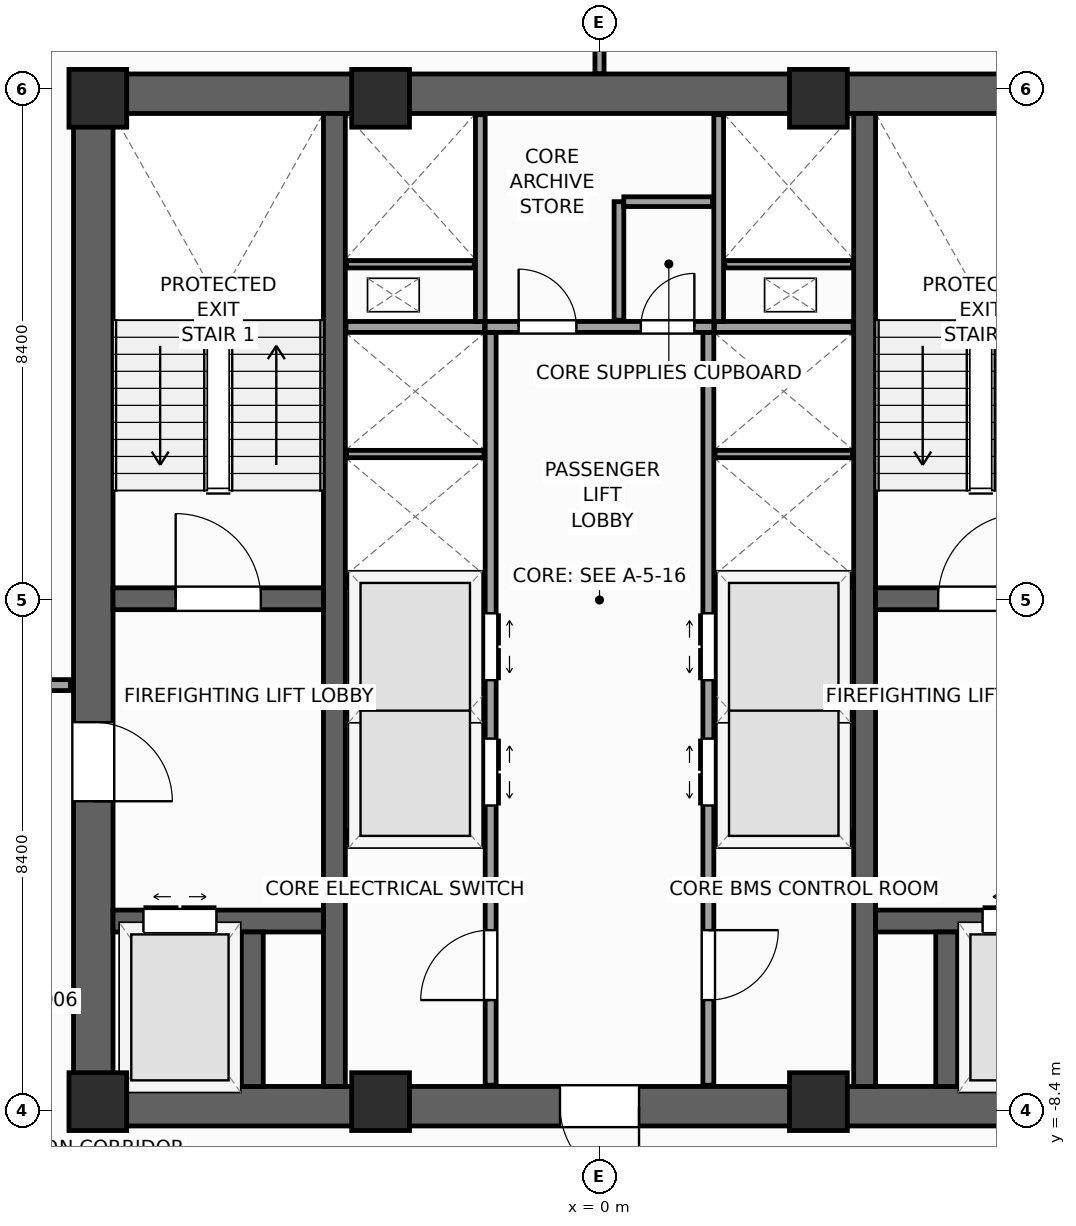
"""IFC4 building model, lengths in metres.
Left out: names, types, materials, properties, quantities, classifications, styles, units other than length and angle.
Written with IfcOpenShell. Run it as: python <this file> out.ifc"""

import sys

from ifc_helpers import new_model, si_unit, direction, frame, frame_2d, origin, origin_2d, place, context, subcontext, project, spatial, rectangle, extrude, source, transform, mapped, element, fill, save


model = new_model("IFC4")
c1 = context("Model", 3, precision=1e-05, world=origin(), true_north=direction((0.0, 1.0)))
c2 = subcontext(c1, "Body", "Model", "MODEL_VIEW")
j1 = project(units=[si_unit("LENGTHUNIT", "METRE"), si_unit("PLANEANGLEUNIT", "RADIAN")], contexts=[c1])
p1 = place(None, origin())
s1 = spatial("IfcSite", under=j1, at=p1, CompositionType="ELEMENT")
p2 = place(p1, origin())
s2 = spatial("IfcBuilding", under=s1, at=p2, CompositionType="ELEMENT")
p3 = place(p2, frame((0.0, 0.0, 148.4)))
s3 = spatial("IfcBuildingStorey", under=s2, at=p3, CompositionType="ELEMENT", Elevation=148.4)
p4 = place(p3, frame((-8.65, -8.325, 0.0), z_axis=(0.0, 0.0, 1.0), x_axis=(1.0, 0.0, 0.0)))
e1 = element("IfcWall", 1, at=p4, inside=s3, PredefinedType="SHEAR", context=c2, shape_type="SweptSolid", body=[
    extrude(rectangle(XDim=17.3, YDim=0.65, at=frame_2d((8.65, 0.0))), origin(), (0.0, 0.0, 1.0), 4.0),
])
p5 = place(p4, frame((8.0, 0.0, 0.0)))
e2 = element("IfcOpeningElement", 2, at=p5, cuts=e1, PredefinedType="OPENING", context=c2, shape_type="SweptSolid", body=[
    extrude(rectangle(XDim=1.3, YDim=2.2, at=frame_2d((0.65, 1.1))), frame((0.0, 0.335, 0.0), z_axis=(0.0, -1.0, 0.0), x_axis=(1.0, 0.0, 0.0)), (0.0, 0.0, 1.0), 0.67),
])
p6 = place(p3, frame((-8.65, 8.325, 0.0), z_axis=(0.0, 0.0, 1.0), x_axis=(1.0, 0.0, 0.0)))
e3 = element("IfcWall", 3, at=p6, inside=s3, PredefinedType="SHEAR", context=c2, shape_type="SweptSolid", body=[
    extrude(rectangle(XDim=17.3, YDim=0.65, at=frame_2d((8.65, 0.0))), origin(), (0.0, 0.0, 1.0), 4.0),
])
p7 = place(p3, frame((-8.325, -8.0, 0.0), z_axis=(0.0, 0.0, 1.0), x_axis=(0.0, 1.0, 0.0)))
e4 = element("IfcWall", 4, at=p7, inside=s3, PredefinedType="SHEAR", context=c2, shape_type="SweptSolid", body=[
    extrude(rectangle(XDim=16.0, YDim=0.65, at=frame_2d((8.0, 0.0))), origin(), (0.0, 0.0, 1.0), 4.0),
])
p8 = place(p7, frame((4.69, 0.0, 0.0)))
e5 = element("IfcOpeningElement", 5, at=p8, cuts=e4, PredefinedType="OPENING", context=c2, shape_type="SweptSolid", body=[
    extrude(rectangle(XDim=1.3, YDim=2.2, at=frame_2d((0.65, 1.1))), frame((0.0, 0.335, 0.0), z_axis=(0.0, -1.0, 0.0), x_axis=(1.0, 0.0, 0.0)), (0.0, 0.0, 1.0), 0.67),
])
for number, where, z_axis, x_axis in (
    (6, (-4.36, -8.0, 0.0), (0.0, 0.0, 1.0), (0.0, 1.0, 0.0)),
    (7, (4.36, -8.0, 0.0), (0.0, 0.0, 1.0), (0.0, 1.0, 0.0)),
):
    element("IfcWall", number, at=place(p3, frame(where, z_axis=z_axis, x_axis=x_axis)), inside=s3, PredefinedType="SHEAR", context=c2, shape_type="SweptSolid", body=[
        extrude(rectangle(XDim=16.0, YDim=0.36, at=frame_2d((8.0, 0.0))), origin(), (0.0, 0.0, 1.0), 4.0),
    ])
p9 = place(p3, frame((-8.0, 0.02, 0.0), z_axis=(0.0, 0.0, 1.0), x_axis=(1.0, 0.0, 0.0)))
e8 = element("IfcWall", 8, at=p9, inside=s3, PredefinedType="SHEAR", context=c2, shape_type="SweptSolid", body=[
    extrude(rectangle(XDim=3.46, YDim=0.36, at=frame_2d((1.73, 0.0))), origin(), (0.0, 0.0, 1.0), 4.0),
])
p10 = place(p9, frame((1.03, 0.0, 0.0)))
e9 = element("IfcOpeningElement", 9, at=p10, cuts=e8, PredefinedType="OPENING", context=c2, shape_type="SweptSolid", body=[
    extrude(rectangle(XDim=1.4, YDim=2.2, at=frame_2d((0.7, 1.1))), frame((0.0, 0.19, 0.0), z_axis=(0.0, -1.0, 0.0), x_axis=(1.0, 0.0, 0.0)), (0.0, 0.0, 1.0), 0.38),
])
p11 = place(p3, frame((4.54, 0.02, 0.0), z_axis=(0.0, 0.0, 1.0), x_axis=(1.0, 0.0, 0.0)))
e10 = element("IfcWall", 10, at=p11, inside=s3, PredefinedType="SHEAR", context=c2, shape_type="SweptSolid", body=[
    extrude(rectangle(XDim=3.46, YDim=0.36, at=frame_2d((1.73, 0.0))), origin(), (0.0, 0.0, 1.0), 4.0),
])
p12 = place(p11, frame((1.03, 0.0, 0.0)))
e11 = element("IfcOpeningElement", 11, at=p12, cuts=e10, PredefinedType="OPENING", context=c2, shape_type="SweptSolid", body=[
    extrude(rectangle(XDim=1.4, YDim=2.2, at=frame_2d((0.7, 1.1))), frame((0.0, 0.19, 0.0), z_axis=(0.0, -1.0, 0.0), x_axis=(1.0, 0.0, 0.0)), (0.0, 0.0, 1.0), 0.38),
])
p13 = place(p3, frame((-8.0, -5.28, 0.0), z_axis=(0.0, 0.0, 1.0), x_axis=(1.0, 0.0, 0.0)))
e12 = element("IfcWall", 12, at=p13, inside=s3, PredefinedType="SHEAR", context=c2, shape_type="SweptSolid", body=[
    extrude(rectangle(XDim=3.46, YDim=0.36, at=frame_2d((1.73, 0.0))), origin(), (0.0, 0.0, 1.0), 4.0),
])
p14 = place(p13, frame((0.5, 0.0, 0.0)))
e13 = element("IfcOpeningElement", 13, at=p14, cuts=e12, PredefinedType="OPENING", context=c2, shape_type="SweptSolid", body=[
    extrude(rectangle(XDim=1.2, YDim=2.25, at=frame_2d((0.6, 1.125))), frame((0.0, 0.19, 0.0), z_axis=(0.0, -1.0, 0.0), x_axis=(1.0, 0.0, 0.0)), (0.0, 0.0, 1.0), 0.38),
])
p15 = place(p3, frame((4.54, -5.28, 0.0), z_axis=(0.0, 0.0, 1.0), x_axis=(1.0, 0.0, 0.0)))
e14 = element("IfcWall", 14, at=p15, inside=s3, PredefinedType="SHEAR", context=c2, shape_type="SweptSolid", body=[
    extrude(rectangle(XDim=3.46, YDim=0.36, at=frame_2d((1.73, 0.0))), origin(), (0.0, 0.0, 1.0), 4.0),
])
p16 = place(p15, frame((1.76, 0.0, 0.0)))
e15 = element("IfcOpeningElement", 15, at=p16, cuts=e14, PredefinedType="OPENING", context=c2, shape_type="SweptSolid", body=[
    extrude(rectangle(XDim=1.2, YDim=2.25, at=frame_2d((0.6, 1.125))), frame((0.0, 0.19, 0.0), z_axis=(0.0, -1.0, 0.0), x_axis=(1.0, 0.0, 0.0)), (0.0, 0.0, 1.0), 0.38),
])
for number, where, z_axis, x_axis in (
    (16, (-5.71, -8.0, 0.0), (0.0, 0.0, 1.0), (0.0, 1.0, 0.0)),
    (17, (5.71, -8.0, 0.0), (0.0, 0.0, 1.0), (0.0, 1.0, 0.0)),
):
    element("IfcWall", number, at=place(p3, frame(where, z_axis=z_axis, x_axis=x_axis)), inside=s3, PredefinedType="SHEAR", context=c2, shape_type="SweptSolid", body=[
        extrude(rectangle(XDim=2.54, YDim=0.36, at=frame_2d((1.27, 0.0))), origin(), (0.0, 0.0, 1.0), 4.0),
    ])
m1 = source(origin(), c2, "Body", "SweptSolid", [
    extrude(rectangle(XDim=0.95, YDim=0.95, at=origin_2d()), origin(), (0.0, 0.0, 1.0), 4.0),
])
for number, where, z_axis, x_axis in (
    (18, (-8.25, -8.25, 0.0), (0.0, 0.0, 1.0), (1.0, 0.0, 0.0)),
    (19, (-8.25, 8.25, 0.0), (0.0, 0.0, 1.0), (1.0, 0.0, 0.0)),
    (20, (-3.6, -8.25, 0.0), (0.0, 0.0, 1.0), (1.0, 0.0, 0.0)),
    (21, (3.6, -8.25, 0.0), (0.0, 0.0, 1.0), (1.0, 0.0, 0.0)),
    (22, (-3.6, 8.25, 0.0), (0.0, 0.0, 1.0), (1.0, 0.0, 0.0)),
    (23, (3.6, 8.25, 0.0), (0.0, 0.0, 1.0), (1.0, 0.0, 0.0)),
):
    element("IfcColumn", number, at=place(p3, frame(where, z_axis=z_axis, x_axis=x_axis)), inside=s3, PredefinedType="PILASTER", context=c2, shape_type="MappedRepresentation", body=[
        mapped(m1, transform((0.0, 0.0, 0.0), scale=1.0)),
    ])
p17 = place(p3, frame((-1.79, -7.98, 0.0), z_axis=(0.0, 0.0, 1.0), x_axis=(0.0, 1.0, 0.0)))
e24 = element("IfcWall", 24, at=p17, inside=s3, PredefinedType="PARTITIONING", context=c2, shape_type="SweptSolid", body=[
    extrude(rectangle(XDim=12.38, YDim=0.18, at=frame_2d((6.19, 0.0))), origin(), (0.0, 0.0, 1.0), 3.74),
])
p18 = place(p17, frame((4.6, 0.0, 0.0)))
e25 = element("IfcOpeningElement", 25, at=p18, cuts=e24, PredefinedType="OPENING", context=c2, shape_type="SweptSolid", body=[
    extrude(rectangle(XDim=1.1, YDim=2.2, at=frame_2d((0.55, 1.1))), frame((0.0, 0.1, 0.0), z_axis=(0.0, -1.0, 0.0), x_axis=(1.0, 0.0, 0.0)), (0.0, 0.0, 1.0), 0.2),
])
p19 = place(p17, frame((6.66, 0.0, 0.0)))
e26 = element("IfcOpeningElement", 26, at=p19, cuts=e24, PredefinedType="OPENING", context=c2, shape_type="SweptSolid", body=[
    extrude(rectangle(XDim=1.1, YDim=2.2, at=frame_2d((0.55, 1.1))), frame((0.0, 0.1, 0.0), z_axis=(0.0, -1.0, 0.0), x_axis=(1.0, 0.0, 0.0)), (0.0, 0.0, 1.0), 0.2),
])
p20 = place(p17, frame((1.4, 0.0, 0.0)))
e27 = element("IfcOpeningElement", 27, at=p20, cuts=e24, PredefinedType="OPENING", context=c2, shape_type="SweptSolid", body=[
    extrude(rectangle(XDim=1.15, YDim=2.25, at=frame_2d((0.575, 1.125))), frame((0.0, 0.1, 0.0), z_axis=(0.0, -1.0, 0.0), x_axis=(1.0, 0.0, 0.0)), (0.0, 0.0, 1.0), 0.2),
])
p21 = place(p3, frame((1.79, -7.98, 0.0), z_axis=(0.0, 0.0, 1.0), x_axis=(0.0, 1.0, 0.0)))
e28 = element("IfcWall", 28, at=p21, inside=s3, PredefinedType="PARTITIONING", context=c2, shape_type="SweptSolid", body=[
    extrude(rectangle(XDim=12.38, YDim=0.18, at=frame_2d((6.19, 0.0))), origin(), (0.0, 0.0, 1.0), 3.74),
])
p22 = place(p21, frame((4.6, 0.0, 0.0)))
e29 = element("IfcOpeningElement", 29, at=p22, cuts=e28, PredefinedType="OPENING", context=c2, shape_type="SweptSolid", body=[
    extrude(rectangle(XDim=1.1, YDim=2.2, at=frame_2d((0.55, 1.1))), frame((0.0, 0.1, 0.0), z_axis=(0.0, -1.0, 0.0), x_axis=(1.0, 0.0, 0.0)), (0.0, 0.0, 1.0), 0.2),
])
p23 = place(p21, frame((6.66, 0.0, 0.0)))
e30 = element("IfcOpeningElement", 30, at=p23, cuts=e28, PredefinedType="OPENING", context=c2, shape_type="SweptSolid", body=[
    extrude(rectangle(XDim=1.1, YDim=2.2, at=frame_2d((0.55, 1.1))), frame((0.0, 0.1, 0.0), z_axis=(0.0, -1.0, 0.0), x_axis=(1.0, 0.0, 0.0)), (0.0, 0.0, 1.0), 0.2),
])
p24 = place(p21, frame((1.4, 0.0, 0.0)))
e31 = element("IfcOpeningElement", 31, at=p24, cuts=e28, PredefinedType="OPENING", context=c2, shape_type="SweptSolid", body=[
    extrude(rectangle(XDim=1.15, YDim=2.25, at=frame_2d((0.575, 1.125))), frame((0.0, 0.1, 0.0), z_axis=(0.0, -1.0, 0.0), x_axis=(1.0, 0.0, 0.0)), (0.0, 0.0, 1.0), 0.2),
])
p25 = place(p3, frame((-1.88, 4.49, 0.0), z_axis=(0.0, 0.0, 1.0), x_axis=(1.0, 0.0, 0.0)))
e32 = element("IfcWall", 32, at=p25, inside=s3, PredefinedType="PARTITIONING", context=c2, shape_type="SweptSolid", body=[
    extrude(rectangle(XDim=3.76, YDim=0.18, at=frame_2d((1.88, 0.0))), origin(), (0.0, 0.0, 1.0), 3.74),
])
p26 = place(p25, frame((0.55, 0.0, 0.0)))
e33 = element("IfcOpeningElement", 33, at=p26, cuts=e32, PredefinedType="OPENING", context=c2, shape_type="SweptSolid", body=[
    extrude(rectangle(XDim=0.95, YDim=2.1, at=frame_2d((0.475, 1.05))), frame((0.0, 0.1, 0.0), z_axis=(0.0, -1.0, 0.0), x_axis=(1.0, 0.0, 0.0)), (0.0, 0.0, 1.0), 0.2),
])
p27 = place(p25, frame((2.56, 0.0, 0.0)))
e34 = element("IfcOpeningElement", 34, at=p27, cuts=e32, PredefinedType="OPENING", context=c2, shape_type="SweptSolid", body=[
    extrude(rectangle(XDim=0.88, YDim=2.1, at=frame_2d((0.44, 1.05))), frame((0.0, 0.1, 0.0), z_axis=(0.0, -1.0, 0.0), x_axis=(1.0, 0.0, 0.0)), (0.0, 0.0, 1.0), 0.2),
])
for number, where, z_axis, x_axis in (
    (35, (-4.17, -3.9, 0.0), (0.0, 0.0, 1.0), (1.0, 0.0, 0.0)),
    (36, (1.89, -3.9, 0.0), (0.0, 0.0, 1.0), (1.0, 0.0, 0.0)),
    (37, (-4.17, 0.3, 0.0), (0.0, 0.0, 1.0), (1.0, 0.0, 0.0)),
    (38, (1.89, 0.3, 0.0), (0.0, 0.0, 1.0), (1.0, 0.0, 0.0)),
    (39, (-4.17, 4.49, 0.0), (0.0, 0.0, 1.0), (1.0, 0.0, 0.0)),
    (40, (1.89, 4.49, 0.0), (0.0, 0.0, 1.0), (1.0, 0.0, 0.0)),
):
    element("IfcWall", number, at=place(p3, frame(where, z_axis=z_axis, x_axis=x_axis)), inside=s3, PredefinedType="PARTITIONING", context=c2, shape_type="SweptSolid", body=[
        extrude(rectangle(XDim=2.28, YDim=0.18, at=frame_2d((1.14, 0.0))), origin(), (0.0, 0.0, 1.0), 3.74),
    ])
for number, where, z_axis, x_axis in (
    (41, (-4.16, -1.8, 0.0), (0.0, 0.0, 1.0), (1.0, 0.0, 0.0)),
    (42, (1.9, -1.8, 0.0), (0.0, 0.0, 1.0), (1.0, 0.0, 0.0)),
    (43, (-4.16, 2.4, 0.0), (0.0, 0.0, 1.0), (1.0, 0.0, 0.0)),
    (44, (1.9, 2.4, 0.0), (0.0, 0.0, 1.0), (1.0, 0.0, 0.0)),
):
    element("IfcWall", number, at=place(p3, frame(where, z_axis=z_axis, x_axis=x_axis)), inside=s3, PredefinedType="PARTITIONING", context=c2, shape_type="SweptSolid", body=[
        extrude(rectangle(XDim=2.26, YDim=0.12, at=frame_2d((1.13, 0.0))), origin(), (0.0, 0.0, 1.0), 3.74),
    ])
for number, where, z_axis, x_axis in (
    (45, (-1.96, 4.58, 0.0), (0.0, 0.0, 1.0), (0.0, 1.0, 0.0)),
    (46, (1.96, 4.58, 0.0), (0.0, 0.0, 1.0), (0.0, 1.0, 0.0)),
):
    element("IfcWall", number, at=place(p3, frame(where, z_axis=z_axis, x_axis=x_axis)), inside=s3, PredefinedType="PARTITIONING", context=c2, shape_type="SweptSolid", body=[
        extrude(rectangle(XDim=3.4, YDim=0.16, at=frame_2d((1.7, 0.0))), origin(), (0.0, 0.0, 1.0), 3.74),
    ])
for number, where, z_axis, x_axis in (
    (47, (-4.16, 5.52, 0.0), (0.0, 0.0, 1.0), (1.0, 0.0, 0.0)),
    (48, (2.06, 5.52, 0.0), (0.0, 0.0, 1.0), (1.0, 0.0, 0.0)),
):
    element("IfcWall", number, at=place(p3, frame(where, z_axis=z_axis, x_axis=x_axis)), inside=s3, PredefinedType="PARTITIONING", context=c2, shape_type="SweptSolid", body=[
        extrude(rectangle(XDim=2.1, YDim=0.12, at=frame_2d((1.05, 0.0))), origin(), (0.0, 0.0, 1.0), 3.74),
    ])
p28 = place(p3, frame((0.32, 4.6, 0.0), z_axis=(0.0, 0.0, 1.0), x_axis=(0.0, 1.0, 0.0)))
e49 = element("IfcWall", 49, at=p28, inside=s3, PredefinedType="PARTITIONING", context=c2, shape_type="SweptSolid", body=[
    extrude(rectangle(XDim=1.95, YDim=0.16, at=frame_2d((0.975, 0.0))), origin(), (0.0, 0.0, 1.0), 3.74),
])
p29 = place(p3, frame((0.4, 6.55, 0.0), z_axis=(0.0, 0.0, 1.0), x_axis=(1.0, 0.0, 0.0)))
e50 = element("IfcWall", 50, at=p29, inside=s3, PredefinedType="PARTITIONING", context=c2, shape_type="SweptSolid", body=[
    extrude(rectangle(XDim=1.46, YDim=0.16, at=frame_2d((0.73, 0.0))), origin(), (0.0, 0.0, 1.0), 3.74),
])
p30 = place(p3, frame((-10.45, -1.4, 0.0), z_axis=(0.0, 0.0, 1.0), x_axis=(1.0, 0.0, 0.0)))
e51 = element("IfcWall", 51, at=p30, inside=s3, PredefinedType="PARTITIONING", context=c2, shape_type="SweptSolid", body=[
    extrude(rectangle(XDim=1.75, YDim=0.18, at=frame_2d((0.875, 0.0))), origin(), (0.0, 0.0, 1.0), 3.74),
])
p31 = place(p30, frame((0.325, 0.0, 0.0)))
e52 = element("IfcOpeningElement", 52, at=p31, cuts=e51, PredefinedType="OPENING", context=c2, shape_type="SweptSolid", body=[
    extrude(rectangle(XDim=1.1, YDim=2.2, at=frame_2d((0.55, 1.1))), frame((0.0, 0.1, 0.0), z_axis=(0.0, -1.0, 0.0), x_axis=(1.0, 0.0, 0.0)), (0.0, 0.0, 1.0), 0.2),
])
p32 = place(p3, frame((0.0, 8.655, 0.0), z_axis=(0.0, 0.0, 1.0), x_axis=(0.0, 1.0, 0.0)))
e53 = element("IfcWall", 53, at=p32, inside=s3, PredefinedType="PARTITIONING", context=c2, shape_type="SweptSolid", body=[
    extrude(rectangle(XDim=21.772, YDim=0.15, at=frame_2d((10.886, 0.0))), origin(), (0.0, 0.0, 1.0), 3.74),
])
m2 = source(origin(), c2, "Body", "SweptSolid", [
    extrude(rectangle(XDim=1.4, YDim=2.2, at=frame_2d((0.7, 1.1))), frame((0.0, 0.025, 0.0), z_axis=(0.0, -1.0, 0.0), x_axis=(1.0, 0.0, 0.0)), (0.0, 0.0, 1.0), 0.05),
])
p33 = place(p10, origin())
e54 = element("IfcDoor", 54, at=p33, inside=s3, OperationType="SINGLE_SWING_LEFT", PredefinedType="DOOR", context=c2, shape_type="MappedRepresentation", body=[
    mapped(m2, transform((0.0, 0.0, 0.0), scale=1.0)),
])
fill(e9, e54)
p34 = place(p12, origin())
e55 = element("IfcDoor", 55, at=p34, inside=s3, OperationType="SINGLE_SWING_RIGHT", PredefinedType="DOOR", context=c2, shape_type="MappedRepresentation", body=[
    mapped(m2, transform((0.0, 0.0, 0.0), scale=1.0)),
])
fill(e11, e55)
m3 = source(origin(), c2, "Body", "SweptSolid", [
    extrude(rectangle(XDim=1.3, YDim=2.2, at=frame_2d((0.65, 1.1))), frame((0.0, 0.025, 0.0), z_axis=(0.0, -1.0, 0.0), x_axis=(1.0, 0.0, 0.0)), (0.0, 0.0, 1.0), 0.05),
])
p35 = place(p8, frame((1.3, 0.0, 0.0), z_axis=(0.0, 0.0, 1.0), x_axis=(-1.0, 0.0, 0.0)))
e56 = element("IfcDoor", 56, at=p35, inside=s3, OperationType="SINGLE_SWING_LEFT", PredefinedType="DOOR", context=c2, shape_type="MappedRepresentation", body=[
    mapped(m3, transform((0.0, 0.0, 0.0), scale=1.0)),
])
fill(e5, e56)
p36 = place(p5, frame((1.3, 0.0, 0.0), z_axis=(0.0, 0.0, 1.0), x_axis=(-1.0, 0.0, 0.0)))
e57 = element("IfcDoor", 57, at=p36, inside=s3, OperationType="SINGLE_SWING_RIGHT", PredefinedType="DOOR", context=c2, shape_type="MappedRepresentation", body=[
    mapped(m3, transform((0.0, 0.0, 0.0), scale=1.0)),
])
fill(e2, e57)
m4 = source(origin(), c2, "Body", "SweptSolid", [
    extrude(rectangle(XDim=1.2, YDim=2.25, at=frame_2d((0.6, 1.125))), frame((0.0, 0.025, 0.0), z_axis=(0.0, -1.0, 0.0), x_axis=(1.0, 0.0, 0.0)), (0.0, 0.0, 1.0), 0.05),
])
p37 = place(p14, origin())
e58 = element("IfcDoor", 58, at=p37, inside=s3, OperationType="DOUBLE_DOOR_SLIDING", PredefinedType="DOOR", context=c2, shape_type="MappedRepresentation", body=[
    mapped(m4, transform((0.0, 0.0, 0.0), scale=1.0)),
])
fill(e13, e58)
p38 = place(p16, origin())
e59 = element("IfcDoor", 59, at=p38, inside=s3, OperationType="DOUBLE_DOOR_SLIDING", PredefinedType="DOOR", context=c2, shape_type="MappedRepresentation", body=[
    mapped(m4, transform((0.0, 0.0, 0.0), scale=1.0)),
])
fill(e15, e59)
m5 = source(origin(), c2, "Body", "SweptSolid", [
    extrude(rectangle(XDim=1.1, YDim=2.2, at=frame_2d((0.55, 1.1))), frame((0.0, 0.025, 0.0), z_axis=(0.0, -1.0, 0.0), x_axis=(1.0, 0.0, 0.0)), (0.0, 0.0, 1.0), 0.05),
])
p39 = place(p18, frame((1.1, 0.0, 0.0), z_axis=(0.0, 0.0, 1.0), x_axis=(-1.0, 0.0, 0.0)))
e60 = element("IfcDoor", 60, at=p39, inside=s3, OperationType="DOUBLE_DOOR_SLIDING", PredefinedType="DOOR", context=c2, shape_type="MappedRepresentation", body=[
    mapped(m5, transform((0.0, 0.0, 0.0), scale=1.0)),
])
fill(e25, e60)
p40 = place(p19, frame((1.1, 0.0, 0.0), z_axis=(0.0, 0.0, 1.0), x_axis=(-1.0, 0.0, 0.0)))
e61 = element("IfcDoor", 61, at=p40, inside=s3, OperationType="DOUBLE_DOOR_SLIDING", PredefinedType="DOOR", context=c2, shape_type="MappedRepresentation", body=[
    mapped(m5, transform((0.0, 0.0, 0.0), scale=1.0)),
])
fill(e26, e61)
p41 = place(p22, origin())
e62 = element("IfcDoor", 62, at=p41, inside=s3, OperationType="DOUBLE_DOOR_SLIDING", PredefinedType="DOOR", context=c2, shape_type="MappedRepresentation", body=[
    mapped(m5, transform((0.0, 0.0, 0.0), scale=1.0)),
])
fill(e29, e62)
p42 = place(p23, origin())
e63 = element("IfcDoor", 63, at=p42, inside=s3, OperationType="DOUBLE_DOOR_SLIDING", PredefinedType="DOOR", context=c2, shape_type="MappedRepresentation", body=[
    mapped(m5, transform((0.0, 0.0, 0.0), scale=1.0)),
])
fill(e30, e63)
m6 = source(origin(), c2, "Body", "SweptSolid", [
    extrude(rectangle(XDim=1.15, YDim=2.25, at=frame_2d((0.575, 1.125))), frame((0.0, 0.025, 0.0), z_axis=(0.0, -1.0, 0.0), x_axis=(1.0, 0.0, 0.0)), (0.0, 0.0, 1.0), 0.05),
])
p43 = place(p20, origin())
e64 = element("IfcDoor", 64, at=p43, inside=s3, OperationType="SINGLE_SWING_LEFT", PredefinedType="DOOR", context=c2, shape_type="MappedRepresentation", body=[
    mapped(m6, transform((0.0, 0.0, 0.0), scale=1.0)),
])
fill(e27, e64)
p44 = place(p24, frame((1.15, 0.0, 0.0), z_axis=(0.0, 0.0, 1.0), x_axis=(-1.0, 0.0, 0.0)))
e65 = element("IfcDoor", 65, at=p44, inside=s3, OperationType="SINGLE_SWING_RIGHT", PredefinedType="DOOR", context=c2, shape_type="MappedRepresentation", body=[
    mapped(m6, transform((0.0, 0.0, 0.0), scale=1.0)),
])
fill(e31, e65)
m7 = source(origin(), c2, "Body", "SweptSolid", [
    extrude(rectangle(XDim=0.95, YDim=2.1, at=frame_2d((0.475, 1.05))), frame((0.0, 0.025, 0.0), z_axis=(0.0, -1.0, 0.0), x_axis=(1.0, 0.0, 0.0)), (0.0, 0.0, 1.0), 0.05),
])
p45 = place(p26, origin())
e66 = element("IfcDoor", 66, at=p45, inside=s3, OperationType="SINGLE_SWING_LEFT", PredefinedType="DOOR", context=c2, shape_type="MappedRepresentation", body=[
    mapped(m7, transform((0.0, 0.0, 0.0), scale=1.0)),
])
fill(e33, e66)
m8 = source(origin(), c2, "Body", "SweptSolid", [
    extrude(rectangle(XDim=0.88, YDim=2.1, at=frame_2d((0.44, 1.05))), frame((0.0, 0.025, 0.0), z_axis=(0.0, -1.0, 0.0), x_axis=(1.0, 0.0, 0.0)), (0.0, 0.0, 1.0), 0.05),
])
p46 = place(p27, origin())
e67 = element("IfcDoor", 67, at=p46, inside=s3, OperationType="SINGLE_SWING_RIGHT", PredefinedType="DOOR", context=c2, shape_type="MappedRepresentation", body=[
    mapped(m8, transform((0.0, 0.0, 0.0), scale=1.0)),
])
fill(e34, e67)
save(model, sys.argv[1])
